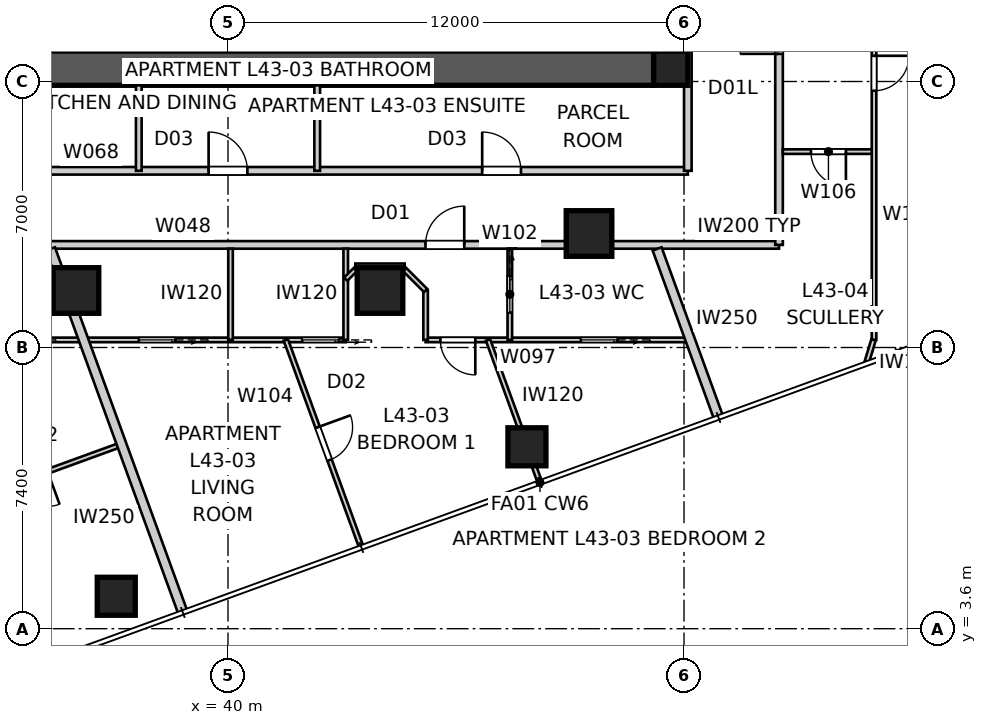
"""IFC4 building model, lengths in metres.
Left out: names, types, materials, properties, quantities, classifications, styles, units other than length and angle.
Written with IfcOpenShell. Run it as: python <this file> out.ifc"""

import sys

from ifc_helpers import new_model, si_unit, direction, frame, frame_2d, origin, origin_2d, place, context, subcontext, project, spatial, polyline, rectangle, outline, extrude, element, fill, save


model = new_model("IFC4")
c1 = context("Model", 3, precision=1e-05, world=origin(), true_north=direction((0.0, 1.0)))
c2 = subcontext(c1, "Body", "Model", "MODEL_VIEW")
j1 = project(units=[si_unit("LENGTHUNIT", "METRE"), si_unit("PLANEANGLEUNIT", "RADIAN")], contexts=[c1])
p1 = place(None, origin())
s1 = spatial("IfcSite", under=j1, at=p1, CompositionType="ELEMENT")
p2 = place(p1, origin())
s2 = spatial("IfcBuilding", under=s1, at=p2, CompositionType="ELEMENT")
p3 = place(p2, frame((0.0, 0.0, 157.4)))
s3 = spatial("IfcBuildingStorey", under=s2, at=p3, CompositionType="ELEMENT", Elevation=157.4)
p4 = place(p3, frame((51.2, 18.35, 0.0), z_axis=(0.0, 0.0, 1.0), x_axis=(-1.0, 0.0, 0.0)))
e1 = element("IfcWall", 1, at=p4, inside=s3, PredefinedType="SHEAR", context=c2, shape_type="SweptSolid", body=[
    extrude(outline(polyline([(0.0, -0.45), (22.4, -0.45), (22.4, -0.025), (22.85, -0.025), (22.85, 0.025), (22.4, 0.025), (22.4, 0.45), (0.0, 0.45), (0.0, 0.025), (-0.45, 0.025), (-0.45, -0.025), (0.0, -0.025), (0.0, -0.45)])), origin(), (0.0, 0.0, 1.0), 3.4),
])
p5 = place(p3, frame((51.65, 18.8, 0.0), z_axis=(0.0, 0.0, 1.0), x_axis=(0.0, 1.0, 0.0)))
e2 = element("IfcWall", 2, at=p5, inside=s3, PredefinedType="SHEAR", context=c2, shape_type="SweptSolid", body=[
    extrude(outline(polyline([(0.0, -0.45), (22.4, -0.45), (22.4, -0.025), (22.85, -0.025), (22.85, 0.025), (22.4, 0.025), (22.4, 0.45), (0.0, 0.45), (0.0, 0.025), (-0.45, 0.025), (-0.45, -0.025), (0.0, -0.025), (0.0, -0.45)])), origin(), (0.0, 0.0, 1.0), 3.4),
])
p6 = place(p5, frame((11.14, 0.0, 0.0)))
e3 = element("IfcOpeningElement", 3, at=p6, cuts=e2, PredefinedType="OPENING", context=c2, shape_type="SweptSolid", body=[
    extrude(rectangle(XDim=1.02, YDim=2.4, at=frame_2d((0.51, 1.2))), frame((0.0, 0.46, 0.0), z_axis=(0.0, -1.0, 0.0), x_axis=(1.0, 0.0, 0.0)), (0.0, 0.0, 1.0), 0.92),
])
p7 = place(p3, frame((51.65, 18.35, 0.0), z_axis=(0.0, 0.0, 1.0), x_axis=(1.0, 0.0, 0.0)))
e4 = element("IfcColumn", 4, at=p7, inside=s3, PredefinedType="COLUMN", context=c2, shape_type="SweptSolid", body=[
    extrude(rectangle(XDim=0.9, YDim=0.9, at=origin_2d()), origin(), (0.0, 0.0, 1.0), 3.4),
])
for number, where, z_axis, x_axis in (
    (5, (37.06, 4.454, 0.0), (0.0, 0.0, 1.0), (1.0, 0.0, 0.0)),
    (6, (47.866, 8.387, 0.0), (0.0, 0.0, 1.0), (1.0, 0.0, 0.0)),
):
    element("IfcColumn", number, at=place(p3, frame(where, z_axis=z_axis, x_axis=x_axis)), inside=s3, PredefinedType="COLUMN", context=c2, shape_type="SweptSolid", body=[
        extrude(rectangle(XDim=1.0, YDim=1.0, at=origin_2d()), origin(), (0.0, 0.0, 1.0), 3.4),
    ])
for number, where, z_axis, x_axis in (
    (7, (36.0, 12.5, 0.0), (0.0, 0.0, 1.0), (1.0, 0.0, 0.0)),
    (8, (44.0, 12.5, 0.0), (0.0, 0.0, 1.0), (1.0, 0.0, 0.0)),
    (9, (49.5, 14.0, 0.0), (0.0, 0.0, 1.0), (1.0, 0.0, 0.0)),
):
    element("IfcColumn", number, at=place(p3, frame(where, z_axis=z_axis, x_axis=x_axis)), inside=s3, PredefinedType="COLUMN", context=c2, shape_type="SweptSolid", body=[
        extrude(rectangle(XDim=1.2, YDim=1.2, at=origin_2d()), origin(), (0.0, 0.0, 1.0), 3.4),
    ])
p8 = place(p3, frame((32.442, 13.7, 0.0), z_axis=(0.0, 0.0, 1.0), x_axis=(1.0, 0.0, 0.0)))
e10 = element("IfcWall", 10, at=p8, inside=s3, PredefinedType="PARTITIONING", context=c2, shape_type="SweptSolid", body=[
    extrude(rectangle(XDim=15.117, YDim=0.2, at=frame_2d((7.558, 0.0))), origin(), (0.0, 0.0, 1.0), 3.25),
])
p9 = place(p8, frame((12.755, 0.0, 0.0)))
e11 = element("IfcOpeningElement", 11, at=p9, cuts=e10, PredefinedType="OPENING", context=c2, shape_type="SweptSolid", body=[
    extrude(rectangle(XDim=1.02, YDim=2.34, at=frame_2d((0.51, 1.17))), frame((0.0, 0.11, 0.0), z_axis=(0.0, -1.0, 0.0), x_axis=(1.0, 0.0, 0.0)), (0.0, 0.0, 1.0), 0.22),
])
p10 = place(p3, frame((47.558, 13.7, 0.0), z_axis=(0.0, 0.0, 1.0), x_axis=(1.0, 0.0, 0.0)))
e12 = element("IfcWall", 12, at=p10, inside=s3, PredefinedType="PARTITIONING", context=c2, shape_type="SweptSolid", body=[
    extrude(rectangle(XDim=1.683, YDim=0.2, at=frame_2d((0.842, 0.0))), origin(), (0.0, 0.0, 1.0), 2.55),
])
p11 = place(p3, frame((49.242, 13.7, 0.0), z_axis=(0.0, 0.0, 1.0), x_axis=(1.0, 0.0, 0.0)))
e13 = element("IfcWall", 13, at=p11, inside=s3, PredefinedType="PARTITIONING", context=c2, shape_type="SweptSolid", body=[
    extrude(rectangle(XDim=5.258, YDim=0.2, at=frame_2d((2.629, 0.0))), origin(), (0.0, 0.0, 1.0), 3.25),
])
p12 = place(p3, frame((54.5, 13.7, 0.0), z_axis=(0.0, 0.0, 1.0), x_axis=(0.0, 1.0, 0.0)))
e14 = element("IfcWall", 14, at=p12, inside=s3, PredefinedType="PARTITIONING", context=c2, shape_type="SweptSolid", body=[
    extrude(rectangle(XDim=33.4, YDim=0.2, at=frame_2d((16.7, 0.0))), origin(), (0.0, 0.0, 1.0), 3.25),
])
p13 = place(p12, frame((5.028, 0.0, 0.0)))
e15 = element("IfcOpeningElement", 15, at=p13, cuts=e14, PredefinedType="OPENING", context=c2, shape_type="SweptSolid", body=[
    extrude(rectangle(XDim=1.02, YDim=2.1, at=frame_2d((0.51, 1.05))), frame((0.0, 0.11, 0.0), z_axis=(0.0, -1.0, 0.0), x_axis=(1.0, 0.0, 0.0)), (0.0, 0.0, 1.0), 0.22),
])
p14 = place(p12, frame((13.587, 0.0, 0.0)))
e16 = element("IfcOpeningElement", 16, at=p14, cuts=e14, PredefinedType="OPENING", context=c2, shape_type="SweptSolid", body=[
    extrude(rectangle(XDim=1.02, YDim=2.34, at=frame_2d((0.51, 1.17))), frame((0.0, 0.11, 0.0), z_axis=(0.0, -1.0, 0.0), x_axis=(1.0, 0.0, 0.0)), (0.0, 0.0, 1.0), 0.22),
])
p15 = place(p3, frame((38.812, 4.027, 0.0), z_axis=(0.0, 0.0, 1.0), x_axis=(-0.342027987857, 0.939689765573, 0.0)))
e17 = element("IfcWall", 17, at=p15, inside=s3, PredefinedType="PARTITIONING", context=c2, shape_type="SweptSolid", body=[
    extrude(rectangle(XDim=10.182, YDim=0.25, at=frame_2d((5.091, 0.0))), origin(), (0.0, 0.0, 1.0), 3.25),
])
p16 = place(p3, frame((52.907, 9.157, 0.0), z_axis=(0.0, 0.0, 1.0), x_axis=(-0.342012883883, 0.939695262975, 0.0)))
e18 = element("IfcWall", 18, at=p16, inside=s3, PredefinedType="PARTITIONING", context=c2, shape_type="SweptSolid", body=[
    extrude(rectangle(XDim=4.722, YDim=0.25, at=frame_2d((2.361, 0.0))), origin(), (0.0, 0.0, 1.0), 3.25),
])
p17 = place(p3, frame((27.9, 15.65, 0.0), z_axis=(0.0, 0.0, 1.0), x_axis=(1.0, 0.0, 0.0)))
e19 = element("IfcWall", 19, at=p17, inside=s3, PredefinedType="PARTITIONING", context=c2, shape_type="SweptSolid", body=[
    extrude(rectangle(XDim=24.2, YDim=0.2, at=frame_2d((12.1, 0.0))), origin(), (0.0, 0.0, 1.0), 3.25),
])
p18 = place(p17, frame((4.391, 0.0, 0.0)))
e20 = element("IfcOpeningElement", 20, at=p18, cuts=e19, PredefinedType="OPENING", context=c2, shape_type="SweptSolid", body=[
    extrude(rectangle(XDim=1.02, YDim=2.1, at=frame_2d((0.51, 1.05))), frame((0.0, 0.11, 0.0), z_axis=(0.0, -1.0, 0.0), x_axis=(1.0, 0.0, 0.0)), (0.0, 0.0, 1.0), 0.22),
])
p19 = place(p17, frame((18.789, 0.0, 0.0)))
e21 = element("IfcOpeningElement", 21, at=p19, cuts=e19, PredefinedType="OPENING", context=c2, shape_type="SweptSolid", body=[
    extrude(rectangle(XDim=1.02, YDim=2.1, at=frame_2d((0.51, 1.05))), frame((0.0, 0.11, 0.0), z_axis=(0.0, -1.0, 0.0), x_axis=(1.0, 0.0, 0.0)), (0.0, 0.0, 1.0), 0.22),
])
p20 = place(p17, frame((11.59, 0.0, 0.0)))
e22 = element("IfcOpeningElement", 22, at=p20, cuts=e19, PredefinedType="OPENING", context=c2, shape_type="SweptSolid", body=[
    extrude(rectangle(XDim=1.02, YDim=2.1, at=frame_2d((0.51, 1.05))), frame((0.0, 0.11, 0.0), z_axis=(0.0, -1.0, 0.0), x_axis=(1.0, 0.0, 0.0)), (0.0, 0.0, 1.0), 0.22),
])
p21 = place(p3, frame((52.1, 15.65, 0.0), z_axis=(0.0, 0.0, 1.0), x_axis=(0.0, 1.0, 0.0)))
e23 = element("IfcWall", 23, at=p21, inside=s3, PredefinedType="PARTITIONING", context=c2, shape_type="SweptSolid", body=[
    extrude(rectangle(XDim=3.17, YDim=0.2, at=frame_2d((1.585, 0.0))), origin(), (0.0, 0.0, 1.0), 3.25),
])
for number, where, z_axis, x_axis in (
    (24, (37.653, 15.65, 0.0), (0.0, 0.0, 1.0), (0.0, 1.0, 0.0)),
    (25, (42.347, 15.65, 0.0), (0.0, 0.0, 1.0), (0.0, 1.0, 0.0)),
):
    element("IfcWall", number, at=place(p3, frame(where, z_axis=z_axis, x_axis=x_axis)), inside=s3, PredefinedType="SOLIDWALL", context=c2, shape_type="SweptSolid", body=[
        extrude(rectangle(XDim=2.25, YDim=0.15, at=frame_2d((1.125, 0.0))), origin(), (0.0, 0.0, 1.0), 3.25),
    ])
p22 = place(p3, frame((43.098, 11.2, 0.0), z_axis=(0.0, 0.0, 1.0), x_axis=(-1.0, 0.0, 0.0)))
e26 = element("IfcWall", 26, at=p22, inside=s3, PredefinedType="PARTITIONING", context=c2, shape_type="SweptSolid", body=[
    extrude(rectangle(XDim=20.098, YDim=0.12, at=frame_2d((10.049, 0.0))), origin(), (0.0, 0.0, 1.0), 3.25),
])
p23 = place(p22, frame((15.701, 0.0, 0.0)))
e27 = element("IfcOpeningElement", 27, at=p23, cuts=e26, PredefinedType="OPENING", context=c2, shape_type="SweptSolid", body=[
    extrude(rectangle(XDim=0.92, YDim=2.34, at=frame_2d((0.46, 1.17))), frame((0.0, 0.07, 0.0), z_axis=(0.0, -1.0, 0.0), x_axis=(1.0, 0.0, 0.0)), (0.0, 0.0, 1.0), 0.14),
])
p24 = place(p22, frame((8.49, 0.0, 0.0)))
e28 = element("IfcOpeningElement", 28, at=p24, cuts=e26, PredefinedType="OPENING", context=c2, shape_type="SweptSolid", body=[
    extrude(rectangle(XDim=0.96, YDim=2.1, at=frame_2d((0.48, 1.05))), frame((0.0, 0.07, 0.0), z_axis=(0.0, -1.0, 0.0), x_axis=(1.0, 0.0, 0.0)), (0.0, 0.0, 1.0), 0.14),
])
p25 = place(p22, frame((0.185, 0.0, 0.0)))
e29 = element("IfcOpeningElement", 29, at=p25, cuts=e26, PredefinedType="OPENING", context=c2, shape_type="SweptSolid", body=[
    extrude(rectangle(XDim=0.96, YDim=2.1, at=frame_2d((0.48, 1.05))), frame((0.0, 0.07, 0.0), z_axis=(0.0, -1.0, 0.0), x_axis=(1.0, 0.0, 0.0)), (0.0, 0.0, 1.0), 0.14),
])
p26 = place(p22, frame((4.484, 0.0, 0.0)))
e30 = element("IfcOpeningElement", 30, at=p26, cuts=e26, PredefinedType="OPENING", context=c2, shape_type="SweptSolid", body=[
    extrude(rectangle(XDim=0.96, YDim=2.1, at=frame_2d((0.48, 1.05))), frame((0.0, 0.07, 0.0), z_axis=(0.0, -1.0, 0.0), x_axis=(1.0, 0.0, 0.0)), (0.0, 0.0, 1.0), 0.14),
])
p27 = place(p3, frame((37.202, 8.449, 0.0), z_axis=(0.0, 0.0, 1.0), x_axis=(-0.939692115443, -0.34202153174, 0.0)))
e31 = element("IfcWall", 31, at=p27, inside=s3, PredefinedType="PARTITIONING", context=c2, shape_type="SweptSolid", body=[
    extrude(rectangle(XDim=5.068, YDim=0.12, at=frame_2d((2.534, 0.0))), origin(), (0.0, 0.0, 1.0), 3.25),
])
p28 = place(p27, frame((2.074, 0.0, 0.0)))
e32 = element("IfcOpeningElement", 32, at=p28, cuts=e31, PredefinedType="OPENING", context=c2, shape_type="SweptSolid", body=[
    extrude(rectangle(XDim=0.92, YDim=2.34, at=frame_2d((0.46, 1.17))), frame((0.0, 0.07, 0.0), z_axis=(0.0, -1.0, 0.0), x_axis=(1.0, 0.0, 0.0)), (0.0, 0.0, 1.0), 0.14),
])
p29 = place(p3, frame((43.098, 11.2, 0.0), z_axis=(0.0, 0.0, 1.0), x_axis=(0.0, 1.0, 0.0)))
e33 = element("IfcWall", 33, at=p29, inside=s3, PredefinedType="PARTITIONING", context=c2, shape_type="SweptSolid", body=[
    extrude(rectangle(XDim=2.4, YDim=0.12, at=frame_2d((1.2, 0.0))), origin(), (0.0, 0.0, 1.0), 3.25),
])
p30 = place(p3, frame((52.164, 11.2, 0.0), z_axis=(0.0, 0.0, 1.0), x_axis=(-1.0, 0.0, 0.0)))
e34 = element("IfcWall", 34, at=p30, inside=s3, PredefinedType="PARTITIONING", context=c2, shape_type="SweptSolid", body=[
    extrude(rectangle(XDim=6.964, YDim=0.12, at=frame_2d((3.482, 0.0))), origin(), (0.0, 0.0, 1.0), 3.25),
])
p31 = place(p30, frame((5.656, 0.0, 0.0)))
e35 = element("IfcOpeningElement", 35, at=p31, cuts=e34, PredefinedType="OPENING", context=c2, shape_type="SweptSolid", body=[
    extrude(rectangle(XDim=0.92, YDim=2.34, at=frame_2d((0.46, 1.17))), frame((0.0, 0.07, 0.0), z_axis=(0.0, -1.0, 0.0), x_axis=(1.0, 0.0, 0.0)), (0.0, 0.0, 1.0), 0.14),
])
p32 = place(p30, frame((1.919, 0.0, 0.0)))
e36 = element("IfcOpeningElement", 36, at=p32, cuts=e34, PredefinedType="OPENING", context=c2, shape_type="SweptSolid", body=[
    extrude(rectangle(XDim=0.96, YDim=2.1, at=frame_2d((0.48, 1.05))), frame((0.0, 0.07, 0.0), z_axis=(0.0, -1.0, 0.0), x_axis=(1.0, 0.0, 0.0)), (0.0, 0.0, 1.0), 0.14),
])
p33 = place(p3, frame((45.2, 11.2, 0.0), z_axis=(0.0, 0.0, 1.0), x_axis=(0.0, 1.0, 0.0)))
e37 = element("IfcWall", 37, at=p33, inside=s3, PredefinedType="PARTITIONING", context=c2, shape_type="SweptSolid", body=[
    extrude(rectangle(XDim=1.3, YDim=0.12, at=frame_2d((0.65, 0.0))), origin(), (0.0, 0.0, 1.0), 3.25),
])
p34 = place(p3, frame((45.2, 12.5, 0.0), z_axis=(0.0, 0.0, 1.0), x_axis=(-0.707106781187, 0.707106781187, 0.0)))
e38 = element("IfcWall", 38, at=p34, inside=s3, PredefinedType="PARTITIONING", context=c2, shape_type="SweptSolid", body=[
    extrude(rectangle(XDim=0.778, YDim=0.12, at=frame_2d((0.389, 0.0))), origin(), (0.0, 0.0, 1.0), 3.25),
])
p35 = place(p3, frame((44.65, 13.15, 0.0), z_axis=(0.0, 0.0, 1.0), x_axis=(-1.0, 0.0, 0.0)))
e39 = element("IfcWall", 39, at=p35, inside=s3, PredefinedType="PARTITIONING", context=c2, shape_type="SweptSolid", body=[
    extrude(rectangle(XDim=1.3, YDim=0.12, at=frame_2d((0.65, 0.0))), origin(), (0.0, 0.0, 1.0), 3.25),
])
p36 = place(p3, frame((43.35, 13.05, 0.0), z_axis=(0.0, 0.0, 1.0), x_axis=(-0.707106781187, -0.707106781187, 0.0)))
e40 = element("IfcWall", 40, at=p36, inside=s3, PredefinedType="PARTITIONING", context=c2, shape_type="SweptSolid", body=[
    extrude(rectangle(XDim=0.357, YDim=0.12, at=frame_2d((0.178, 0.0))), origin(), (0.0, 0.0, 1.0), 3.25),
])
p37 = place(p3, frame((47.416, 13.6, 0.0), z_axis=(0.0, 0.0, 1.0), x_axis=(0.0, -1.0, 0.0)))
e41 = element("IfcWall", 41, at=p37, inside=s3, PredefinedType="PARTITIONING", context=c2, shape_type="SweptSolid", body=[
    extrude(rectangle(XDim=2.4, YDim=0.12, at=frame_2d((1.2, 0.0))), origin(), (0.0, 0.0, 1.0), 3.25),
])
p38 = place(p37, frame((0.72, 0.0, 0.0)))
e42 = element("IfcOpeningElement", 42, at=p38, cuts=e41, PredefinedType="OPENING", context=c2, shape_type="SweptSolid", body=[
    extrude(rectangle(XDim=0.96, YDim=2.1, at=frame_2d((0.48, 1.05))), frame((0.0, 0.07, 0.0), z_axis=(0.0, -1.0, 0.0), x_axis=(1.0, 0.0, 0.0)), (0.0, 0.0, 1.0), 0.14),
])
p39 = place(p3, frame((40.067, 13.6, 0.0), z_axis=(0.0, 0.0, 1.0), x_axis=(0.0, -1.0, 0.0)))
e43 = element("IfcWall", 43, at=p39, inside=s3, PredefinedType="PARTITIONING", context=c2, shape_type="SweptSolid", body=[
    extrude(rectangle(XDim=2.4, YDim=0.12, at=frame_2d((1.2, 0.0))), origin(), (0.0, 0.0, 1.0), 2.796),
])
p40 = place(p3, frame((41.522, 11.2, 0.0), z_axis=(0.0, 0.0, 1.0), x_axis=(0.342028262279, -0.939689665689, 0.0)))
e44 = element("IfcWall", 44, at=p40, inside=s3, PredefinedType="PARTITIONING", context=c2, shape_type="SweptSolid", body=[
    extrude(rectangle(XDim=5.773, YDim=0.12, at=frame_2d((2.887, 0.0))), origin(), (0.0, 0.0, 1.0), 3.25),
])
p41 = place(p40, frame((2.447, 0.0, 0.0)))
e45 = element("IfcOpeningElement", 45, at=p41, cuts=e44, PredefinedType="OPENING", context=c2, shape_type="SweptSolid", body=[
    extrude(rectangle(XDim=0.92, YDim=2.34, at=frame_2d((0.46, 1.17))), frame((0.0, 0.07, 0.0), z_axis=(0.0, -1.0, 0.0), x_axis=(1.0, 0.0, 0.0)), (0.0, 0.0, 1.0), 0.14),
])
p42 = place(p3, frame((46.843, 11.2, 0.0), z_axis=(0.0, 0.0, 1.0), x_axis=(0.341990966768, -0.939703239672, 0.0)))
e46 = element("IfcWall", 46, at=p42, inside=s3, PredefinedType="PARTITIONING", context=c2, shape_type="SweptSolid", body=[
    extrude(rectangle(XDim=3.953, YDim=0.12, at=frame_2d((1.977, 0.0))), origin(), (0.0, 0.0, 1.0), 3.25),
])
p43 = place(p3, frame((57.0, 16.155, 0.0), z_axis=(0.0, 0.0, 1.0), x_axis=(-1.0, 0.0, 0.0)))
e47 = element("IfcWall", 47, at=p43, inside=s3, PredefinedType="PARTITIONING", context=c2, shape_type="SweptSolid", body=[
    extrude(rectangle(XDim=2.4, YDim=0.12, at=frame_2d((1.2, 0.0))), origin(), (0.0, 0.0, 1.0), 3.25),
])
p44 = place(p43, frame((0.74, 0.0, 0.0)))
e48 = element("IfcOpeningElement", 48, at=p44, cuts=e47, PredefinedType="OPENING", context=c2, shape_type="SweptSolid", body=[
    extrude(rectangle(XDim=0.92, YDim=2.34, at=frame_2d((0.46, 1.17))), frame((0.0, 0.07, 0.0), z_axis=(0.0, -1.0, 0.0), x_axis=(1.0, 0.0, 0.0)), (0.0, 0.0, 1.0), 0.14),
])
p45 = place(p3, frame((57.0, 30.92, 0.0), z_axis=(0.0, 0.0, 1.0), x_axis=(0.0, -1.0, 0.0)))
e49 = element("IfcWall", 49, at=p45, inside=s3, PredefinedType="PARTITIONING", context=c2, shape_type="SweptSolid", body=[
    extrude(rectangle(XDim=19.72, YDim=0.12, at=frame_2d((9.86, 0.0))), origin(), (0.0, 0.0, 1.0), 2.55),
])
p46 = place(p45, frame((12.243, 0.0, 0.0)))
e50 = element("IfcOpeningElement", 50, at=p46, cuts=e49, PredefinedType="OPENING", context=c2, shape_type="SweptSolid", body=[
    extrude(rectangle(XDim=0.92, YDim=2.34, at=frame_2d((0.46, 1.17))), frame((0.0, 0.07, 0.0), z_axis=(0.0, -1.0, 0.0), x_axis=(1.0, 0.0, 0.0)), (0.0, 0.0, 1.0), 0.14),
])
p47 = place(p45, frame((8.764, 0.0, 0.0)))
e51 = element("IfcOpeningElement", 51, at=p47, cuts=e49, PredefinedType="OPENING", context=c2, shape_type="SweptSolid", body=[
    extrude(rectangle(XDim=0.92, YDim=2.34, at=frame_2d((0.46, 1.17))), frame((0.0, 0.07, 0.0), z_axis=(0.0, -1.0, 0.0), x_axis=(1.0, 0.0, 0.0)), (0.0, 0.0, 1.0), 0.14),
])
p48 = place(p45, frame((2.227, 0.0, 0.0)))
e52 = element("IfcOpeningElement", 52, at=p48, cuts=e49, PredefinedType="OPENING", context=c2, shape_type="SweptSolid", body=[
    extrude(rectangle(XDim=0.92, YDim=2.34, at=frame_2d((0.46, 1.17))), frame((0.0, 0.07, 0.0), z_axis=(0.0, -1.0, 0.0), x_axis=(1.0, 0.0, 0.0)), (0.0, 0.0, 1.0), 0.14),
])
p49 = place(p3, frame((56.987, 11.2, 0.0), z_axis=(0.0, 0.0, 1.0), x_axis=(-0.290455219909, -0.956888585588, 0.0)))
e53 = element("IfcWall", 53, at=p49, inside=s3, PredefinedType="PARTITIONING", context=c2, shape_type="SweptSolid", body=[
    extrude(rectangle(XDim=0.605, YDim=0.12, at=frame_2d((0.303, 0.0))), origin(), (0.0, 0.0, 1.0), 3.25),
])
p50 = place(p19, origin())
e54 = element("IfcDoor", 54, at=p50, inside=s3, OperationType="SINGLE_SWING_LEFT", PredefinedType="DOOR", context=c2, shape_type="SweptSolid", body=[
    extrude(rectangle(XDim=1.02, YDim=2.1, at=frame_2d((0.51, 1.05))), frame((0.0, 0.025, 0.0), z_axis=(0.0, -1.0, 0.0), x_axis=(1.0, 0.0, 0.0)), (0.0, 0.0, 1.0), 0.05),
])
fill(e21, e54)
p51 = place(p13, origin())
e55 = element("IfcDoor", 55, at=p51, inside=s3, OperationType="SINGLE_SWING_LEFT", PredefinedType="DOOR", context=c2, shape_type="SweptSolid", body=[
    extrude(rectangle(XDim=1.02, YDim=2.1, at=frame_2d((0.51, 1.05))), frame((0.0, 0.025, 0.0), z_axis=(0.0, -1.0, 0.0), x_axis=(1.0, 0.0, 0.0)), (0.0, 0.0, 1.0), 0.05),
])
fill(e15, e55)
p52 = place(p9, origin())
e56 = element("IfcDoor", 56, at=p52, inside=s3, OperationType="SINGLE_SWING_RIGHT", PredefinedType="DOOR", context=c2, shape_type="SweptSolid", body=[
    extrude(rectangle(XDim=1.02, YDim=2.34, at=frame_2d((0.51, 1.17))), frame((0.0, 0.025, 0.0), z_axis=(0.0, -1.0, 0.0), x_axis=(1.0, 0.0, 0.0)), (0.0, 0.0, 1.0), 0.05),
])
fill(e11, e56)
p53 = place(p20, origin())
e57 = element("IfcDoor", 57, at=p53, inside=s3, OperationType="SINGLE_SWING_LEFT", PredefinedType="DOOR", context=c2, shape_type="SweptSolid", body=[
    extrude(rectangle(XDim=1.02, YDim=2.1, at=frame_2d((0.51, 1.05))), frame((0.0, 0.025, 0.0), z_axis=(0.0, -1.0, 0.0), x_axis=(1.0, 0.0, 0.0)), (0.0, 0.0, 1.0), 0.05),
])
fill(e22, e57)
p54 = place(p46, origin())
e58 = element("IfcDoor", 58, at=p54, inside=s3, OperationType="SINGLE_SWING_LEFT", PredefinedType="DOOR", context=c2, shape_type="SweptSolid", body=[
    extrude(rectangle(XDim=0.92, YDim=2.34, at=frame_2d((0.46, 1.17))), frame((0.0, 0.025, 0.0), z_axis=(0.0, -1.0, 0.0), x_axis=(1.0, 0.0, 0.0)), (0.0, 0.0, 1.0), 0.05),
])
fill(e50, e58)
p55 = place(p44, origin())
e59 = element("IfcDoor", 59, at=p55, inside=s3, OperationType="SINGLE_SWING_LEFT", PredefinedType="DOOR", context=c2, shape_type="SweptSolid", body=[
    extrude(rectangle(XDim=0.92, YDim=2.34, at=frame_2d((0.46, 1.17))), frame((0.0, 0.025, 0.0), z_axis=(0.0, -1.0, 0.0), x_axis=(1.0, 0.0, 0.0)), (0.0, 0.0, 1.0), 0.05),
])
fill(e48, e59)
p56 = place(p38, origin())
e60 = element("IfcDoor", 60, at=p56, inside=s3, OperationType="SLIDING_TO_LEFT", PredefinedType="DOOR", context=c2, shape_type="SweptSolid", body=[
    extrude(rectangle(XDim=0.96, YDim=2.1, at=frame_2d((0.48, 1.05))), frame((0.0, 0.025, 0.0), z_axis=(0.0, -1.0, 0.0), x_axis=(1.0, 0.0, 0.0)), (0.0, 0.0, 1.0), 0.05),
])
fill(e42, e60)
p57 = place(p31, origin())
e61 = element("IfcDoor", 61, at=p57, inside=s3, OperationType="SINGLE_SWING_LEFT", PredefinedType="DOOR", context=c2, shape_type="SweptSolid", body=[
    extrude(rectangle(XDim=0.92, YDim=2.34, at=frame_2d((0.46, 1.17))), frame((0.0, 0.025, 0.0), z_axis=(0.0, -1.0, 0.0), x_axis=(1.0, 0.0, 0.0)), (0.0, 0.0, 1.0), 0.05),
])
fill(e35, e61)
p58 = place(p32, origin())
e62 = element("IfcDoor", 62, at=p58, inside=s3, OperationType="SLIDING_TO_LEFT", PredefinedType="DOOR", context=c2, shape_type="SweptSolid", body=[
    extrude(rectangle(XDim=0.96, YDim=2.1, at=frame_2d((0.48, 1.05))), frame((0.0, 0.025, 0.0), z_axis=(0.0, -1.0, 0.0), x_axis=(1.0, 0.0, 0.0)), (0.0, 0.0, 1.0), 0.05),
])
fill(e36, e62)
p59 = place(p41, origin())
e63 = element("IfcDoor", 63, at=p59, inside=s3, OperationType="SINGLE_SWING_LEFT", PredefinedType="DOOR", context=c2, shape_type="SweptSolid", body=[
    extrude(rectangle(XDim=0.92, YDim=2.34, at=frame_2d((0.46, 1.17))), frame((0.0, 0.025, 0.0), z_axis=(0.0, -1.0, 0.0), x_axis=(1.0, 0.0, 0.0)), (0.0, 0.0, 1.0), 0.05),
])
fill(e45, e63)
p60 = place(p25, origin())
e64 = element("IfcDoor", 64, at=p60, inside=s3, OperationType="SLIDING_TO_LEFT", PredefinedType="DOOR", context=c2, shape_type="SweptSolid", body=[
    extrude(rectangle(XDim=0.96, YDim=2.1, at=frame_2d((0.48, 1.05))), frame((0.0, 0.025, 0.0), z_axis=(0.0, -1.0, 0.0), x_axis=(1.0, 0.0, 0.0)), (0.0, 0.0, 1.0), 0.05),
])
fill(e29, e64)
p61 = place(p26, origin())
e65 = element("IfcDoor", 65, at=p61, inside=s3, OperationType="SLIDING_TO_LEFT", PredefinedType="DOOR", context=c2, shape_type="SweptSolid", body=[
    extrude(rectangle(XDim=0.96, YDim=2.1, at=frame_2d((0.48, 1.05))), frame((0.0, 0.025, 0.0), z_axis=(0.0, -1.0, 0.0), x_axis=(1.0, 0.0, 0.0)), (0.0, 0.0, 1.0), 0.05),
])
fill(e30, e65)
save(model, sys.argv[1])
